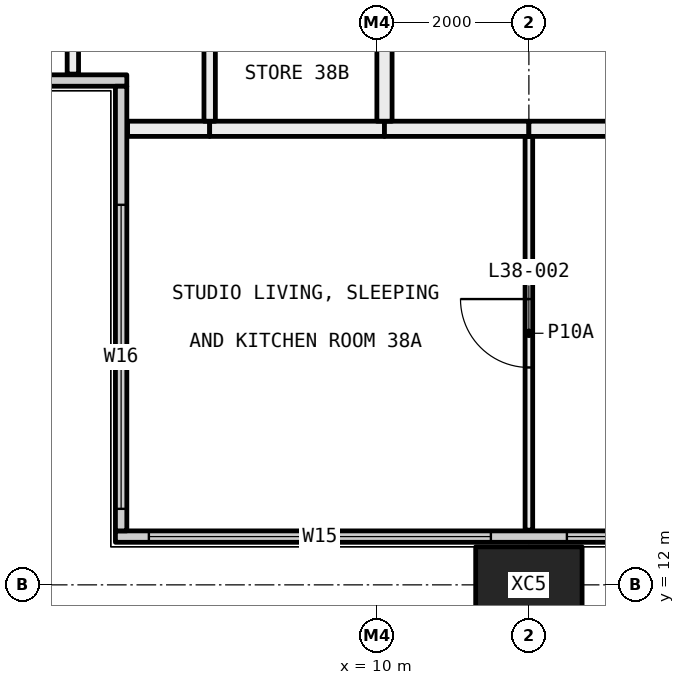
"""IFC4 building model, lengths in metres.
Left out: names, types, materials, properties, quantities, classifications, styles, units other than length and angle.
Written with IfcOpenShell. Run it as: python <this file> out.ifc"""

import sys

from ifc_helpers import new_model, si_unit, direction, frame, frame_2d, origin, origin_2d, place, context, subcontext, project, spatial, rectangle, hollow_rectangle, extrude, element, fill, save


model = new_model("IFC4")
c1 = context("Model", 3, precision=1e-05, world=origin(), true_north=direction((0.0, 1.0)))
c2 = subcontext(c1, "Body", "Model", "MODEL_VIEW")
j1 = project(units=[si_unit("LENGTHUNIT", "METRE"), si_unit("PLANEANGLEUNIT", "RADIAN")], contexts=[c1])
p1 = place(None, origin())
s1 = spatial("IfcSite", under=j1, at=p1, CompositionType="ELEMENT")
p2 = place(p1, origin())
s2 = spatial("IfcBuilding", under=s1, at=p2, CompositionType="ELEMENT")
p3 = place(p2, frame((0.0, 0.0, 144.9)))
s3 = spatial("IfcBuildingStorey", under=s2, at=p3, CompositionType="ELEMENT", Elevation=144.9)
p4 = place(p3, frame((12.0, 12.0, -0.4), z_axis=(0.0, 0.0, 1.0), x_axis=(1.0, 0.0, 0.0)))
e1 = element("IfcColumn", 1, at=p4, inside=s3, PredefinedType="COLUMN", context=c2, shape_type="SweptSolid", body=[
    extrude(hollow_rectangle(XDim=1.4, YDim=1.0, WallThickness=0.055, at=origin_2d()), origin(), (0.0, 0.0, 1.0), 3.45),
])
p5 = place(p3, frame((6.56, 12.635, 0.0), z_axis=(0.0, 0.0, 1.0), x_axis=(1.0, 0.0, 0.0)))
e2 = element("IfcWall", 2, at=p5, inside=s3, PredefinedType="ELEMENTEDWALL", context=c2, shape_type="SweptSolid", body=[
    extrude(rectangle(XDim=58.88, YDim=0.15, at=frame_2d((29.44, 0.0))), origin(), (0.0, 0.0, 1.0), 3.05),
])
p6 = place(p5, frame((0.44, 0.0, 0.45)))
e3 = element("IfcOpeningElement", 3, at=p6, cuts=e2, PredefinedType="OPENING", context=c2, shape_type="SweptSolid", body=[
    extrude(rectangle(XDim=4.5, YDim=2.55, at=frame_2d((2.25, 1.275))), frame((0.0, 0.085, 0.0), z_axis=(0.0, -1.0, 0.0), x_axis=(1.0, 0.0, 0.0)), (0.0, 0.0, 1.0), 0.17),
])
p7 = place(p5, frame((5.94, 0.0, 0.45)))
e4 = element("IfcOpeningElement", 4, at=p7, cuts=e2, PredefinedType="OPENING", context=c2, shape_type="SweptSolid", body=[
    extrude(rectangle(XDim=2.0, YDim=2.55, at=frame_2d((1.0, 1.275))), frame((0.0, 0.085, 0.0), z_axis=(0.0, -1.0, 0.0), x_axis=(1.0, 0.0, 0.0)), (0.0, 0.0, 1.0), 0.17),
])
p8 = place(p5, frame((10.19, 0.0, 0.45)))
e5 = element("IfcOpeningElement", 5, at=p8, cuts=e2, PredefinedType="OPENING", context=c2, shape_type="SweptSolid", body=[
    extrude(rectangle(XDim=0.75, YDim=2.55, at=frame_2d((0.375, 1.275))), frame((0.0, 0.085, 0.0), z_axis=(0.0, -1.0, 0.0), x_axis=(1.0, 0.0, 0.0)), (0.0, 0.0, 1.0), 0.17),
])
p9 = place(p5, frame((11.94, 0.0, 0.45)))
e6 = element("IfcOpeningElement", 6, at=p9, cuts=e2, PredefinedType="OPENING", context=c2, shape_type="SweptSolid", body=[
    extrude(rectangle(XDim=0.75, YDim=2.55, at=frame_2d((0.375, 1.275))), frame((0.0, 0.085, 0.0), z_axis=(0.0, -1.0, 0.0), x_axis=(1.0, 0.0, 0.0)), (0.0, 0.0, 1.0), 0.17),
])
p10 = place(p5, frame((14.94, 0.0, 0.45)))
e7 = element("IfcOpeningElement", 7, at=p10, cuts=e2, PredefinedType="OPENING", context=c2, shape_type="SweptSolid", body=[
    extrude(rectangle(XDim=2.0, YDim=2.55, at=frame_2d((1.0, 1.275))), frame((0.0, 0.085, 0.0), z_axis=(0.0, -1.0, 0.0), x_axis=(1.0, 0.0, 0.0)), (0.0, 0.0, 1.0), 0.17),
])
p11 = place(p5, frame((17.94, 0.0, 0.45)))
e8 = element("IfcOpeningElement", 8, at=p11, cuts=e2, PredefinedType="OPENING", context=c2, shape_type="SweptSolid", body=[
    extrude(rectangle(XDim=2.0, YDim=2.55, at=frame_2d((1.0, 1.275))), frame((0.0, 0.085, 0.0), z_axis=(0.0, -1.0, 0.0), x_axis=(1.0, 0.0, 0.0)), (0.0, 0.0, 1.0), 0.17),
])
p12 = place(p5, frame((22.19, 0.0, 0.45)))
e9 = element("IfcOpeningElement", 9, at=p12, cuts=e2, PredefinedType="OPENING", context=c2, shape_type="SweptSolid", body=[
    extrude(rectangle(XDim=0.75, YDim=2.55, at=frame_2d((0.375, 1.275))), frame((0.0, 0.085, 0.0), z_axis=(0.0, -1.0, 0.0), x_axis=(1.0, 0.0, 0.0)), (0.0, 0.0, 1.0), 0.17),
])
p13 = place(p5, frame((23.94, 0.0, 0.45)))
e10 = element("IfcOpeningElement", 10, at=p13, cuts=e2, PredefinedType="OPENING", context=c2, shape_type="SweptSolid", body=[
    extrude(rectangle(XDim=0.75, YDim=2.55, at=frame_2d((0.375, 1.275))), frame((0.0, 0.085, 0.0), z_axis=(0.0, -1.0, 0.0), x_axis=(1.0, 0.0, 0.0)), (0.0, 0.0, 1.0), 0.17),
])
p14 = place(p5, frame((26.94, 0.0, 0.45)))
e11 = element("IfcOpeningElement", 11, at=p14, cuts=e2, PredefinedType="OPENING", context=c2, shape_type="SweptSolid", body=[
    extrude(rectangle(XDim=2.0, YDim=2.55, at=frame_2d((1.0, 1.275))), frame((0.0, 0.085, 0.0), z_axis=(0.0, -1.0, 0.0), x_axis=(1.0, 0.0, 0.0)), (0.0, 0.0, 1.0), 0.17),
])
p15 = place(p5, frame((29.94, 0.0, 0.45)))
e12 = element("IfcOpeningElement", 12, at=p15, cuts=e2, PredefinedType="OPENING", context=c2, shape_type="SweptSolid", body=[
    extrude(rectangle(XDim=2.0, YDim=2.55, at=frame_2d((1.0, 1.275))), frame((0.0, 0.085, 0.0), z_axis=(0.0, -1.0, 0.0), x_axis=(1.0, 0.0, 0.0)), (0.0, 0.0, 1.0), 0.17),
])
p16 = place(p5, frame((34.19, 0.0, 0.45)))
e13 = element("IfcOpeningElement", 13, at=p16, cuts=e2, PredefinedType="OPENING", context=c2, shape_type="SweptSolid", body=[
    extrude(rectangle(XDim=0.75, YDim=2.55, at=frame_2d((0.375, 1.275))), frame((0.0, 0.085, 0.0), z_axis=(0.0, -1.0, 0.0), x_axis=(1.0, 0.0, 0.0)), (0.0, 0.0, 1.0), 0.17),
])
p17 = place(p5, frame((35.94, 0.0, 0.45)))
e14 = element("IfcOpeningElement", 14, at=p17, cuts=e2, PredefinedType="OPENING", context=c2, shape_type="SweptSolid", body=[
    extrude(rectangle(XDim=0.75, YDim=2.55, at=frame_2d((0.375, 1.275))), frame((0.0, 0.085, 0.0), z_axis=(0.0, -1.0, 0.0), x_axis=(1.0, 0.0, 0.0)), (0.0, 0.0, 1.0), 0.17),
])
p18 = place(p5, frame((38.94, 0.0, 0.45)))
e15 = element("IfcOpeningElement", 15, at=p18, cuts=e2, PredefinedType="OPENING", context=c2, shape_type="SweptSolid", body=[
    extrude(rectangle(XDim=2.0, YDim=2.55, at=frame_2d((1.0, 1.275))), frame((0.0, 0.085, 0.0), z_axis=(0.0, -1.0, 0.0), x_axis=(1.0, 0.0, 0.0)), (0.0, 0.0, 1.0), 0.17),
])
p19 = place(p5, frame((41.94, 0.0, 0.45)))
e16 = element("IfcOpeningElement", 16, at=p19, cuts=e2, PredefinedType="OPENING", context=c2, shape_type="SweptSolid", body=[
    extrude(rectangle(XDim=2.0, YDim=2.55, at=frame_2d((1.0, 1.275))), frame((0.0, 0.085, 0.0), z_axis=(0.0, -1.0, 0.0), x_axis=(1.0, 0.0, 0.0)), (0.0, 0.0, 1.0), 0.17),
])
p20 = place(p5, frame((46.19, 0.0, 0.45)))
e17 = element("IfcOpeningElement", 17, at=p20, cuts=e2, PredefinedType="OPENING", context=c2, shape_type="SweptSolid", body=[
    extrude(rectangle(XDim=0.75, YDim=2.55, at=frame_2d((0.375, 1.275))), frame((0.0, 0.085, 0.0), z_axis=(0.0, -1.0, 0.0), x_axis=(1.0, 0.0, 0.0)), (0.0, 0.0, 1.0), 0.17),
])
p21 = place(p5, frame((47.94, 0.0, 0.45)))
e18 = element("IfcOpeningElement", 18, at=p21, cuts=e2, PredefinedType="OPENING", context=c2, shape_type="SweptSolid", body=[
    extrude(rectangle(XDim=0.75, YDim=2.55, at=frame_2d((0.375, 1.275))), frame((0.0, 0.085, 0.0), z_axis=(0.0, -1.0, 0.0), x_axis=(1.0, 0.0, 0.0)), (0.0, 0.0, 1.0), 0.17),
])
p22 = place(p5, frame((50.94, 0.0, 0.45)))
e19 = element("IfcOpeningElement", 19, at=p22, cuts=e2, PredefinedType="OPENING", context=c2, shape_type="SweptSolid", body=[
    extrude(rectangle(XDim=2.0, YDim=2.55, at=frame_2d((1.0, 1.275))), frame((0.0, 0.085, 0.0), z_axis=(0.0, -1.0, 0.0), x_axis=(1.0, 0.0, 0.0)), (0.0, 0.0, 1.0), 0.17),
])
p23 = place(p5, frame((53.94, 0.0, 0.45)))
e20 = element("IfcOpeningElement", 20, at=p23, cuts=e2, PredefinedType="OPENING", context=c2, shape_type="SweptSolid", body=[
    extrude(rectangle(XDim=4.5, YDim=2.55, at=frame_2d((2.25, 1.275))), frame((0.0, 0.085, 0.0), z_axis=(0.0, -1.0, 0.0), x_axis=(1.0, 0.0, 0.0)), (0.0, 0.0, 1.0), 0.17),
])
p24 = place(p3, frame((0.56, 18.635, 0.0), z_axis=(0.0, 0.0, 1.0), x_axis=(1.0, 0.0, 0.0)))
e21 = element("IfcWall", 21, at=p24, inside=s3, PredefinedType="ELEMENTEDWALL", context=c2, shape_type="SweptSolid", body=[
    extrude(rectangle(XDim=6.15, YDim=0.15, at=frame_2d((3.075, 0.0))), origin(), (0.0, 0.0, 1.0), 3.05),
])
p25 = place(p24, frame((0.44, 0.0, 0.45)))
e22 = element("IfcOpeningElement", 22, at=p25, cuts=e21, PredefinedType="OPENING", context=c2, shape_type="SweptSolid", body=[
    extrude(rectangle(XDim=4.0, YDim=2.55, at=frame_2d((2.0, 1.275))), frame((0.0, 0.085, 0.0), z_axis=(0.0, -1.0, 0.0), x_axis=(1.0, 0.0, 0.0)), (0.0, 0.0, 1.0), 0.17),
])
p26 = place(p3, frame((6.635, 12.71, 0.0), z_axis=(0.0, 0.0, 1.0), x_axis=(0.0, 1.0, 0.0)))
e23 = element("IfcWall", 23, at=p26, inside=s3, PredefinedType="ELEMENTEDWALL", context=c2, shape_type="SweptSolid", body=[
    extrude(rectangle(XDim=5.85, YDim=0.15, at=frame_2d((2.925, 0.0))), origin(), (0.0, 0.0, 1.0), 3.05),
])
p27 = place(p26, frame((0.29, 0.0, 0.45)))
e24 = element("IfcOpeningElement", 24, at=p27, cuts=e23, PredefinedType="OPENING", context=c2, shape_type="SweptSolid", body=[
    extrude(rectangle(XDim=4.0, YDim=2.55, at=frame_2d((2.0, 1.275))), frame((0.0, 0.085, 0.0), z_axis=(0.0, -1.0, 0.0), x_axis=(1.0, 0.0, 0.0)), (0.0, 0.0, 1.0), 0.17),
])
p28 = place(p3, frame((12.0, 12.72, 0.0), z_axis=(0.0, 0.0, 1.0), x_axis=(0.0, 1.0, 0.0)))
e25 = element("IfcWall", 25, at=p28, inside=s3, PredefinedType="PARTITIONING", context=c2, shape_type="SweptSolid", body=[
    extrude(rectangle(XDim=5.18, YDim=0.1, at=frame_2d((2.59, 0.0))), origin(), (0.0, 0.0, 1.0), 3.05),
])
p29 = place(p28, frame((2.14, 0.0, 0.0)))
e26 = element("IfcOpeningElement", 26, at=p29, cuts=e25, PredefinedType="OPENING", context=c2, shape_type="SweptSolid", body=[
    extrude(rectangle(XDim=0.9, YDim=2.1, at=frame_2d((0.45, 1.05))), frame((0.0, 0.06, 0.0), z_axis=(0.0, -1.0, 0.0), x_axis=(1.0, 0.0, 0.0)), (0.0, 0.0, 1.0), 0.12),
])
p30 = place(p3, frame((7.8, 18.0, 0.0), z_axis=(0.0, 0.0, 1.0), x_axis=(-1.0, 0.0, 0.0)))
e27 = element("IfcWall", 27, at=p30, inside=s3, PredefinedType="PARTITIONING", context=c2, shape_type="SweptSolid", body=[
    extrude(rectangle(XDim=1.08, YDim=0.2, at=frame_2d((0.54, 0.0))), origin(), (0.0, 0.0, 1.0), 3.05),
])
p31 = place(p3, frame((10.1, 18.0, 0.0), z_axis=(0.0, 0.0, 1.0), x_axis=(-1.0, 0.0, 0.0)))
e28 = element("IfcWall", 28, at=p31, inside=s3, PredefinedType="PARTITIONING", context=c2, shape_type="SweptSolid", body=[
    extrude(rectangle(XDim=2.3, YDim=0.2, at=frame_2d((1.15, 0.0))), origin(), (0.0, 0.0, 1.0), 3.05),
])
p32 = place(p3, frame((12.0, 18.0, 0.0), z_axis=(0.0, 0.0, 1.0), x_axis=(-1.0, 0.0, 0.0)))
e29 = element("IfcWall", 29, at=p32, inside=s3, PredefinedType="PARTITIONING", context=c2, shape_type="SweptSolid", body=[
    extrude(rectangle(XDim=1.9, YDim=0.2, at=frame_2d((0.95, 0.0))), origin(), (0.0, 0.0, 1.0), 3.05),
])
p33 = place(p3, frame((18.0, 18.0, 0.0), z_axis=(0.0, 0.0, 1.0), x_axis=(-1.0, 0.0, 0.0)))
e30 = element("IfcWall", 30, at=p33, inside=s3, PredefinedType="PARTITIONING", context=c2, shape_type="SweptSolid", body=[
    extrude(rectangle(XDim=6.0, YDim=0.2, at=frame_2d((3.0, 0.0))), origin(), (0.0, 0.0, 1.0), 3.05),
])
p34 = place(p33, frame((2.5, 0.0, 0.0)))
e31 = element("IfcOpeningElement", 31, at=p34, cuts=e30, PredefinedType="OPENING", context=c2, shape_type="SweptSolid", body=[
    extrude(rectangle(XDim=1.0, YDim=2.1, at=frame_2d((0.5, 1.05))), frame((0.0, 0.11, 0.0), z_axis=(0.0, -1.0, 0.0), x_axis=(1.0, 0.0, 0.0)), (0.0, 0.0, 1.0), 0.22),
])
p35 = place(p3, frame((6.0, 18.72, 0.0), z_axis=(0.0, 0.0, 1.0), x_axis=(0.0, 1.0, 0.0)))
e32 = element("IfcWall", 32, at=p35, inside=s3, PredefinedType="PARTITIONING", context=c2, shape_type="SweptSolid", body=[
    extrude(rectangle(XDim=2.28, YDim=0.15, at=frame_2d((1.14, 0.0))), origin(), (0.0, 0.0, 1.0), 3.05),
])
p36 = place(p3, frame((7.8, 18.1, 0.0), z_axis=(0.0, 0.0, 1.0), x_axis=(0.0, 1.0, 0.0)))
e33 = element("IfcWall", 33, at=p36, inside=s3, PredefinedType="PARTITIONING", context=c2, shape_type="SweptSolid", body=[
    extrude(rectangle(XDim=2.9, YDim=0.15, at=frame_2d((1.45, 0.0))), origin(), (0.0, 0.0, 1.0), 3.05),
])
p37 = place(p3, frame((10.1, 18.1, 0.0), z_axis=(0.0, 0.0, 1.0), x_axis=(0.0, 1.0, 0.0)))
e34 = element("IfcWall", 34, at=p37, inside=s3, PredefinedType="PARTITIONING", context=c2, shape_type="SweptSolid", body=[
    extrude(rectangle(XDim=2.9, YDim=0.2, at=frame_2d((1.45, 0.0))), origin(), (0.0, 0.0, 1.0), 3.05),
])
p38 = place(p6, origin())
e35 = element("IfcWindow", 35, at=p38, inside=s3, PartitioningType="SINGLE_PANEL", PredefinedType="WINDOW", context=c2, shape_type="SweptSolid", body=[
    extrude(rectangle(XDim=4.5, YDim=2.55, at=frame_2d((2.25, 1.275))), frame((0.0, 0.03, 0.0), z_axis=(0.0, -1.0, 0.0), x_axis=(1.0, 0.0, 0.0)), (0.0, 0.0, 1.0), 0.06),
])
fill(e3, e35)
p39 = place(p7, origin())
e36 = element("IfcWindow", 36, at=p39, inside=s3, PartitioningType="SINGLE_PANEL", PredefinedType="WINDOW", context=c2, shape_type="SweptSolid", body=[
    extrude(rectangle(XDim=2.0, YDim=2.55, at=frame_2d((1.0, 1.275))), frame((0.0, 0.03, 0.0), z_axis=(0.0, -1.0, 0.0), x_axis=(1.0, 0.0, 0.0)), (0.0, 0.0, 1.0), 0.06),
])
fill(e4, e36)
p40 = place(p27, origin())
e37 = element("IfcWindow", 37, at=p40, inside=s3, PartitioningType="SINGLE_PANEL", PredefinedType="WINDOW", context=c2, shape_type="SweptSolid", body=[
    extrude(rectangle(XDim=4.0, YDim=2.55, at=frame_2d((2.0, 1.275))), frame((0.0, 0.03, 0.0), z_axis=(0.0, -1.0, 0.0), x_axis=(1.0, 0.0, 0.0)), (0.0, 0.0, 1.0), 0.06),
])
fill(e24, e37)
p41 = place(p29, origin())
e38 = element("IfcDoor", 38, at=p41, inside=s3, OperationType="SINGLE_SWING_LEFT", PredefinedType="DOOR", context=c2, shape_type="SweptSolid", body=[
    extrude(rectangle(XDim=0.9, YDim=2.1, at=frame_2d((0.45, 1.05))), frame((0.0, 0.025, 0.0), z_axis=(0.0, -1.0, 0.0), x_axis=(1.0, 0.0, 0.0)), (0.0, 0.0, 1.0), 0.05),
])
fill(e26, e38)
save(model, sys.argv[1])
